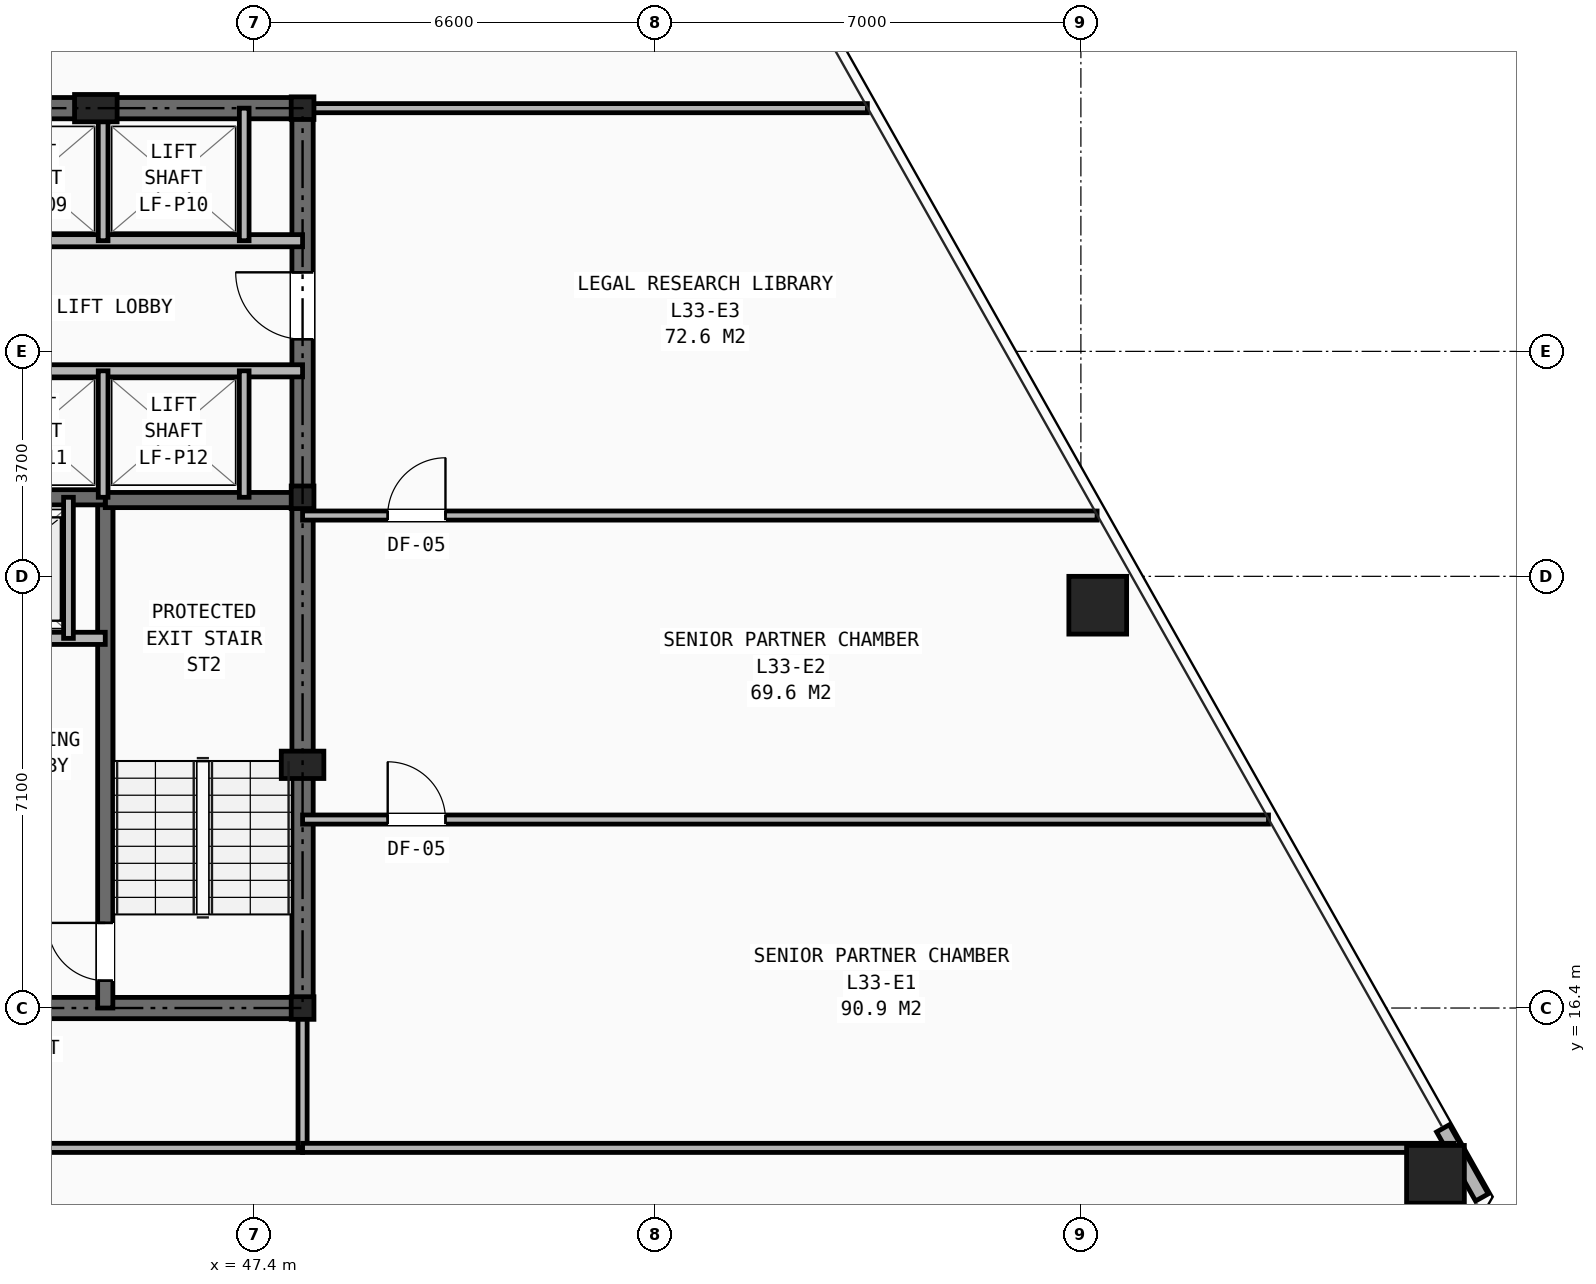
"""IFC4 building model, lengths in metres.
Left out: names, types, materials, properties, quantities, classifications, styles, units other than length and angle.
Written with IfcOpenShell. Run it as: python <this file> out.ifc"""

import sys

from ifc_helpers import new_model, si_unit, direction, frame, frame_2d, origin, origin_2d, place, context, subcontext, project, spatial, rectangle, hollow_rectangle, i_section, extrude, element, fill, save


model = new_model("IFC4")
c1 = context("Model", 3, precision=1e-05, world=origin(), true_north=direction((0.0, 1.0)))
c2 = subcontext(c1, "Body", "Model", "MODEL_VIEW")
j1 = project(units=[si_unit("LENGTHUNIT", "METRE"), si_unit("PLANEANGLEUNIT", "RADIAN")], contexts=[c1])
p1 = place(None, origin())
s1 = spatial("IfcSite", under=j1, at=p1, CompositionType="ELEMENT")
p2 = place(p1, origin())
s2 = spatial("IfcBuilding", under=s1, at=p2, CompositionType="ELEMENT")
p3 = place(p2, frame((0.0, 0.0, 116.0)))
s3 = spatial("IfcBuildingStorey", under=s2, at=p3, CompositionType="ELEMENT", Elevation=116.0)
for number, where, z_axis, x_axis in (
    (1, (48.2, 16.4, 0.0), (0.0, 0.0, 1.0), (1.0, 0.0, 0.0)),
    (2, (48.2, 24.8, 0.0), (0.0, 0.0, 1.0), (1.0, 0.0, 0.0)),
    (3, (48.2, 31.2, 0.0), (0.0, 0.0, 1.0), (1.0, 0.0, 0.0)),
):
    element("IfcColumn", number, at=place(p3, frame(where, z_axis=z_axis, x_axis=x_axis)), inside=s3, PredefinedType="COLUMN", context=c2, shape_type="SweptSolid", body=[
        extrude(i_section(OverallWidth=0.374, OverallDepth=0.372, WebThickness=0.016, FlangeThickness=0.026, at=origin_2d()), origin(), (0.0, 0.0, 1.0), 3.45),
    ])
for number, where, z_axis, x_axis in (
    (4, (48.2, 20.4, 0.0), (0.0, 0.0, 1.0), (1.0, 0.0, 0.0)),
    (5, (44.8, 31.2, 0.0), (0.0, 0.0, 1.0), (1.0, 0.0, 0.0)),
):
    element("IfcColumn", number, at=place(p3, frame(where, z_axis=z_axis, x_axis=x_axis)), inside=s3, PredefinedType="PILASTER", context=c2, shape_type="SweptSolid", body=[
        extrude(rectangle(XDim=0.7, YDim=0.45, at=origin_2d()), origin(), (0.0, 0.0, 1.0), 3.45),
    ])
for number, where, z_axis, x_axis in (
    (6, (66.831, 13.665, 0.0), (0.0, 0.0, 1.0), (1.0, 0.0, 0.0)),
    (7, (61.277, 23.025, 0.0), (0.0, 0.0, 1.0), (1.0, 0.0, 0.0)),
):
    element("IfcColumn", number, at=place(p3, frame(where, z_axis=z_axis, x_axis=x_axis)), inside=s3, PredefinedType="COLUMN", context=c2, shape_type="SweptSolid", body=[
        extrude(hollow_rectangle(XDim=0.95, YDim=0.95, WallThickness=0.065, at=origin_2d()), origin(), (0.0, 0.0, 1.0), 3.45),
    ])
p4 = place(p3, frame((67.596, 13.285, 0.0), z_axis=(0.0, 0.0, 1.0), x_axis=(-0.4912738615, 0.871005162446, 0.0)))
e8 = element("IfcWall", 8, at=p4, inside=s3, PredefinedType="SHEAR", context=c2, shape_type="SweptSolid", body=[
    extrude(rectangle(XDim=1.304, YDim=0.24, at=frame_2d((0.652, 0.0))), origin(), (0.0, 0.0, 1.0), 2.583),
])
p5 = place(p3, frame((31.8, 16.4, 0.0), z_axis=(0.0, 0.0, 1.0), x_axis=(1.0, 0.0, 0.0)))
e9 = element("IfcWall", 9, at=p5, inside=s3, PredefinedType="SHEAR", context=c2, shape_type="SweptSolid", body=[
    extrude(rectangle(XDim=16.4, YDim=0.35, at=frame_2d((8.2, 0.0))), origin(), (0.0, 0.0, 1.0), 3.21),
])
p6 = place(p5, frame((7.75, 0.0, 0.0)))
e10 = element("IfcOpeningElement", 10, at=p6, cuts=e9, PredefinedType="OPENING", context=c2, shape_type="SweptSolid", body=[
    extrude(rectangle(XDim=0.9, YDim=2.1, at=frame_2d((0.45, 1.05))), frame((0.0, 0.185, 0.0), z_axis=(0.0, -1.0, 0.0), x_axis=(1.0, 0.0, 0.0)), (0.0, 0.0, 1.0), 0.37),
])
p7 = place(p5, frame((4.2, 0.0, 0.0)))
e11 = element("IfcOpeningElement", 11, at=p7, cuts=e9, PredefinedType="OPENING", context=c2, shape_type="SweptSolid", body=[
    extrude(rectangle(XDim=0.95, YDim=2.1, at=frame_2d((0.475, 1.05))), frame((0.0, 0.185, 0.0), z_axis=(0.0, -1.0, 0.0), x_axis=(1.0, 0.0, 0.0)), (0.0, 0.0, 1.0), 0.37),
])
p8 = place(p5, frame((10.6, 0.0, 0.0)))
e12 = element("IfcOpeningElement", 12, at=p8, cuts=e9, PredefinedType="OPENING", context=c2, shape_type="SweptSolid", body=[
    extrude(rectangle(XDim=0.95, YDim=2.1, at=frame_2d((0.475, 1.05))), frame((0.0, 0.185, 0.0), z_axis=(0.0, -1.0, 0.0), x_axis=(1.0, 0.0, 0.0)), (0.0, 0.0, 1.0), 0.37),
])
p9 = place(p3, frame((31.8, 31.2, 0.0), z_axis=(0.0, 0.0, 1.0), x_axis=(1.0, 0.0, 0.0)))
e13 = element("IfcWall", 13, at=p9, inside=s3, PredefinedType="SHEAR", context=c2, shape_type="SweptSolid", body=[
    extrude(rectangle(XDim=16.4, YDim=0.35, at=frame_2d((8.2, 0.0))), origin(), (0.0, 0.0, 1.0), 3.21),
])
p10 = place(p3, frame((48.2, 16.4, 0.0), z_axis=(0.0, 0.0, 1.0), x_axis=(0.0, 1.0, 0.0)))
e14 = element("IfcWall", 14, at=p10, inside=s3, PredefinedType="SHEAR", context=c2, shape_type="SweptSolid", body=[
    extrude(rectangle(XDim=14.8, YDim=0.35, at=frame_2d((7.4, 0.0))), origin(), (0.0, 0.0, 1.0), 3.21),
])
p11 = place(p10, frame((11.0, 0.0, 0.0)))
e15 = element("IfcOpeningElement", 15, at=p11, cuts=e14, PredefinedType="OPENING", context=c2, shape_type="SweptSolid", body=[
    extrude(rectangle(XDim=1.1, YDim=2.15, at=frame_2d((0.55, 1.075))), frame((0.0, 0.185, 0.0), z_axis=(0.0, -1.0, 0.0), x_axis=(1.0, 0.0, 0.0)), (0.0, 0.0, 1.0), 0.37),
])
p12 = place(p3, frame((44.955, 16.4, 0.0), z_axis=(0.0, 0.0, 1.0), x_axis=(0.0, 1.0, 0.0)))
e16 = element("IfcWall", 16, at=p12, inside=s3, PredefinedType="SHEAR", context=c2, shape_type="SweptSolid", body=[
    extrude(rectangle(XDim=8.4, YDim=0.25, at=frame_2d((4.2, 0.0))), origin(), (0.0, 0.0, 1.0), 3.21),
])
p13 = place(p12, frame((0.45, 0.0, 0.0)))
e17 = element("IfcOpeningElement", 17, at=p13, cuts=e16, PredefinedType="OPENING", context=c2, shape_type="SweptSolid", body=[
    extrude(rectangle(XDim=0.95, YDim=2.1, at=frame_2d((0.475, 1.05))), frame((0.0, 0.135, 0.0), z_axis=(0.0, -1.0, 0.0), x_axis=(1.0, 0.0, 0.0)), (0.0, 0.0, 1.0), 0.27),
])
p14 = place(p3, frame((44.955, 24.755, 0.0), z_axis=(0.0, 0.0, 1.0), x_axis=(1.0, 0.0, 0.0)))
e18 = element("IfcWall", 18, at=p14, inside=s3, PredefinedType="SHEAR", context=c2, shape_type="SweptSolid", body=[
    extrude(rectangle(XDim=3.245, YDim=0.25, at=frame_2d((1.623, 0.0))), origin(), (0.0, 0.0, 1.0), 3.21),
])
p15 = place(p3, frame((35.045, 24.8, 0.0), z_axis=(0.0, 0.0, 1.0), x_axis=(1.0, 0.0, 0.0)))
e19 = element("IfcWall", 19, at=p15, inside=s3, PredefinedType="SHEAR", context=c2, shape_type="SweptSolid", body=[
    extrude(rectangle(XDim=9.91, YDim=0.25, at=frame_2d((4.955, 0.0))), origin(), (0.0, 0.0, 1.0), 3.21),
])
p16 = place(p3, frame((35.045, 22.48, 0.0), z_axis=(0.0, 0.0, 1.0), x_axis=(1.0, 0.0, 0.0)))
e20 = element("IfcWall", 20, at=p16, inside=s3, PredefinedType="SOLIDWALL", context=c2, shape_type="SweptSolid", body=[
    extrude(rectangle(XDim=9.91, YDim=0.2, at=frame_2d((4.955, 0.0))), origin(), (0.0, 0.0, 1.0), 3.21),
])
p17 = place(p16, frame((1.255, 0.0, 0.0)))
e21 = element("IfcOpeningElement", 21, at=p17, cuts=e20, PredefinedType="OPENING", context=c2, shape_type="SweptSolid", body=[
    extrude(rectangle(XDim=1.1, YDim=2.15, at=frame_2d((0.55, 1.075))), frame((0.0, 0.11, 0.0), z_axis=(0.0, -1.0, 0.0), x_axis=(1.0, 0.0, 0.0)), (0.0, 0.0, 1.0), 0.22),
])
p18 = place(p16, frame((7.555, 0.0, 0.0)))
e22 = element("IfcOpeningElement", 22, at=p18, cuts=e20, PredefinedType="OPENING", context=c2, shape_type="SweptSolid", body=[
    extrude(rectangle(XDim=1.1, YDim=2.15, at=frame_2d((0.55, 1.075))), frame((0.0, 0.11, 0.0), z_axis=(0.0, -1.0, 0.0), x_axis=(1.0, 0.0, 0.0)), (0.0, 0.0, 1.0), 0.22),
])
p19 = place(p16, frame((4.405, 0.0, 0.0)))
e23 = element("IfcOpeningElement", 23, at=p19, cuts=e20, PredefinedType="OPENING", context=c2, shape_type="SweptSolid", body=[
    extrude(rectangle(XDim=1.1, YDim=2.15, at=frame_2d((0.55, 1.075))), frame((0.0, 0.11, 0.0), z_axis=(0.0, -1.0, 0.0), x_axis=(1.0, 0.0, 0.0)), (0.0, 0.0, 1.0), 0.22),
])
p20 = place(p3, frame((44.35, 22.48, 0.0), z_axis=(0.0, 0.0, 1.0), x_axis=(0.0, 1.0, 0.0)))
e24 = element("IfcWall", 24, at=p20, inside=s3, PredefinedType="SOLIDWALL", context=c2, shape_type="SweptSolid", body=[
    extrude(rectangle(XDim=2.32, YDim=0.16, at=frame_2d((1.16, 0.0))), origin(), (0.0, 0.0, 1.0), 3.21),
])
p21 = place(p3, frame((31.8, 29.02, 0.0), z_axis=(0.0, 0.0, 1.0), x_axis=(1.0, 0.0, 0.0)))
e25 = element("IfcWall", 25, at=p21, inside=s3, PredefinedType="SOLIDWALL", context=c2, shape_type="SweptSolid", body=[
    extrude(rectangle(XDim=16.4, YDim=0.2, at=frame_2d((8.2, 0.0))), origin(), (0.0, 0.0, 1.0), 2.661),
])
p22 = place(p21, frame((0.55, 0.0, 0.0)))
e26 = element("IfcOpeningElement", 26, at=p22, cuts=e25, PredefinedType="OPENING", context=c2, shape_type="SweptSolid", body=[
    extrude(rectangle(XDim=0.85, YDim=2.05, at=frame_2d((0.425, 1.025))), frame((0.0, 0.11, 0.0), z_axis=(0.0, -1.0, 0.0), x_axis=(1.0, 0.0, 0.0)), (0.0, 0.0, 1.0), 0.22),
])
p23 = place(p3, frame((31.8, 26.88, 0.0), z_axis=(0.0, 0.0, 1.0), x_axis=(1.0, 0.0, 0.0)))
e27 = element("IfcWall", 27, at=p23, inside=s3, PredefinedType="SOLIDWALL", context=c2, shape_type="SweptSolid", body=[
    extrude(rectangle(XDim=16.4, YDim=0.2, at=frame_2d((8.2, 0.0))), origin(), (0.0, 0.0, 1.0), 2.661),
])
p24 = place(p23, frame((0.55, 0.0, 0.0)))
e28 = element("IfcOpeningElement", 28, at=p24, cuts=e27, PredefinedType="OPENING", context=c2, shape_type="SweptSolid", body=[
    extrude(rectangle(XDim=0.85, YDim=2.05, at=frame_2d((0.425, 1.025))), frame((0.0, 0.11, 0.0), z_axis=(0.0, -1.0, 0.0), x_axis=(1.0, 0.0, 0.0)), (0.0, 0.0, 1.0), 0.22),
])
p25 = place(p23, frame((2.55, 0.0, 0.0)))
e29 = element("IfcOpeningElement", 29, at=p25, cuts=e27, PredefinedType="OPENING", context=c2, shape_type="SweptSolid", body=[
    extrude(rectangle(XDim=1.1, YDim=2.15, at=frame_2d((0.55, 1.075))), frame((0.0, 0.11, 0.0), z_axis=(0.0, -1.0, 0.0), x_axis=(1.0, 0.0, 0.0)), (0.0, 0.0, 1.0), 0.22),
])
p26 = place(p23, frame((4.71, 0.0, 0.0)))
e30 = element("IfcOpeningElement", 30, at=p26, cuts=e27, PredefinedType="OPENING", context=c2, shape_type="SweptSolid", body=[
    extrude(rectangle(XDim=1.1, YDim=2.15, at=frame_2d((0.55, 1.075))), frame((0.0, 0.11, 0.0), z_axis=(0.0, -1.0, 0.0), x_axis=(1.0, 0.0, 0.0)), (0.0, 0.0, 1.0), 0.22),
])
p27 = place(p23, frame((6.87, 0.0, 0.0)))
e31 = element("IfcOpeningElement", 31, at=p27, cuts=e27, PredefinedType="OPENING", context=c2, shape_type="SweptSolid", body=[
    extrude(rectangle(XDim=1.1, YDim=2.15, at=frame_2d((0.55, 1.075))), frame((0.0, 0.11, 0.0), z_axis=(0.0, -1.0, 0.0), x_axis=(1.0, 0.0, 0.0)), (0.0, 0.0, 1.0), 0.22),
])
p28 = place(p23, frame((9.03, 0.0, 0.0)))
e32 = element("IfcOpeningElement", 32, at=p28, cuts=e27, PredefinedType="OPENING", context=c2, shape_type="SweptSolid", body=[
    extrude(rectangle(XDim=1.1, YDim=2.15, at=frame_2d((0.55, 1.075))), frame((0.0, 0.11, 0.0), z_axis=(0.0, -1.0, 0.0), x_axis=(1.0, 0.0, 0.0)), (0.0, 0.0, 1.0), 0.22),
])
for number, where, z_axis, x_axis in (
    (33, (44.92, 29.02, 0.0), (0.0, 0.0, 1.0), (0.0, 1.0, 0.0)),
    (34, (47.24, 29.02, 0.0), (0.0, 0.0, 1.0), (0.0, 1.0, 0.0)),
):
    element("IfcWall", number, at=place(p3, frame(where, z_axis=z_axis, x_axis=x_axis)), inside=s3, PredefinedType="SOLIDWALL", context=c2, shape_type="SweptSolid", body=[
        extrude(rectangle(XDim=2.18, YDim=0.16, at=frame_2d((1.09, 0.0))), origin(), (0.0, 0.0, 1.0), 2.661),
    ])
for number, where, z_axis, x_axis in (
    (35, (44.92, 24.8, 0.0), (0.0, 0.0, 1.0), (0.0, 1.0, 0.0)),
    (36, (47.24, 24.8, 0.0), (0.0, 0.0, 1.0), (0.0, 1.0, 0.0)),
):
    element("IfcWall", number, at=place(p3, frame(where, z_axis=z_axis, x_axis=x_axis)), inside=s3, PredefinedType="SOLIDWALL", context=c2, shape_type="SweptSolid", body=[
        extrude(rectangle(XDim=2.08, YDim=0.16, at=frame_2d((1.04, 0.0))), origin(), (0.0, 0.0, 1.0), 3.21),
    ])
p29 = place(p3, frame((29.6, 14.1, 0.0), z_axis=(0.0, 0.0, 1.0), x_axis=(1.0, 0.0, 0.0)))
e37 = element("IfcWall", 37, at=p29, inside=s3, PredefinedType="PARTITIONING", context=c2, shape_type="SweptSolid", body=[
    extrude(rectangle(XDim=18.6, YDim=0.15, at=frame_2d((9.3, 0.0))), origin(), (0.0, 0.0, 1.0), 2.225),
])
p30 = place(p29, frame((0.55, 0.0, 0.0)))
e38 = element("IfcOpeningElement", 38, at=p30, cuts=e37, PredefinedType="OPENING", context=c2, shape_type="SweptSolid", body=[
    extrude(rectangle(XDim=0.95, YDim=2.1, at=frame_2d((0.475, 1.05))), frame((0.0, 0.085, 0.0), z_axis=(0.0, -1.0, 0.0), x_axis=(1.0, 0.0, 0.0)), (0.0, 0.0, 1.0), 0.17),
])
p31 = place(p29, frame((3.95, 0.0, 0.0)))
e39 = element("IfcOpeningElement", 39, at=p31, cuts=e37, PredefinedType="OPENING", context=c2, shape_type="SweptSolid", body=[
    extrude(rectangle(XDim=0.95, YDim=2.1, at=frame_2d((0.475, 1.05))), frame((0.0, 0.085, 0.0), z_axis=(0.0, -1.0, 0.0), x_axis=(1.0, 0.0, 0.0)), (0.0, 0.0, 1.0), 0.17),
])
p32 = place(p29, frame((8.55, 0.0, 0.0)))
e40 = element("IfcOpeningElement", 40, at=p32, cuts=e37, PredefinedType="OPENING", context=c2, shape_type="SweptSolid", body=[
    extrude(rectangle(XDim=0.95, YDim=2.1, at=frame_2d((0.475, 1.05))), frame((0.0, 0.085, 0.0), z_axis=(0.0, -1.0, 0.0), x_axis=(1.0, 0.0, 0.0)), (0.0, 0.0, 1.0), 0.17),
])
p33 = place(p29, frame((13.35, 0.0, 0.0)))
e41 = element("IfcOpeningElement", 41, at=p33, cuts=e37, PredefinedType="OPENING", context=c2, shape_type="SweptSolid", body=[
    extrude(rectangle(XDim=0.95, YDim=2.1, at=frame_2d((0.475, 1.05))), frame((0.0, 0.085, 0.0), z_axis=(0.0, -1.0, 0.0), x_axis=(1.0, 0.0, 0.0)), (0.0, 0.0, 1.0), 0.17),
])
p34 = place(p3, frame((48.2, 14.1, 0.0), z_axis=(0.0, 0.0, 1.0), x_axis=(0.0, 1.0, 0.0)))
e42 = element("IfcWall", 42, at=p34, inside=s3, PredefinedType="PARTITIONING", context=c2, shape_type="SweptSolid", body=[
    extrude(rectangle(XDim=2.3, YDim=0.15, at=frame_2d((1.15, 0.0))), origin(), (0.0, 0.0, 1.0), 2.661),
])
p35 = place(p3, frame((48.2, 31.2, 0.0), z_axis=(0.0, 0.0, 1.0), x_axis=(1.0, 0.0, 0.0)))
e43 = element("IfcWall", 43, at=p35, inside=s3, PredefinedType="PARTITIONING", context=c2, shape_type="SweptSolid", body=[
    extrude(rectangle(XDim=9.289, YDim=0.15, at=frame_2d((4.645, 0.0))), origin(), (0.0, 0.0, 1.0), 2.225),
])
p36 = place(p3, frame((48.2, 14.1, 0.0), z_axis=(0.0, 0.0, 1.0), x_axis=(1.0, 0.0, 0.0)))
e44 = element("IfcWall", 44, at=p36, inside=s3, PredefinedType="PARTITIONING", context=c2, shape_type="SweptSolid", body=[
    extrude(rectangle(XDim=18.93, YDim=0.15, at=frame_2d((9.465, 0.0))), origin(), (0.0, 0.0, 1.0), 2.225),
])
p37 = place(p3, frame((48.2, 19.5, 0.0), z_axis=(0.0, 0.0, 1.0), x_axis=(1.0, 0.0, 0.0)))
e45 = element("IfcWall", 45, at=p37, inside=s3, PredefinedType="PARTITIONING", context=c2, shape_type="SweptSolid", body=[
    extrude(rectangle(XDim=15.885, YDim=0.15, at=frame_2d((7.943, 0.0))), origin(), (0.0, 0.0, 1.0), 2.589),
])
p38 = place(p37, frame((1.4, 0.0, 0.0)))
e46 = element("IfcOpeningElement", 46, at=p38, cuts=e45, PredefinedType="OPENING", context=c2, shape_type="SweptSolid", body=[
    extrude(rectangle(XDim=0.95, YDim=2.1, at=frame_2d((0.475, 1.05))), frame((0.0, 0.085, 0.0), z_axis=(0.0, -1.0, 0.0), x_axis=(1.0, 0.0, 0.0)), (0.0, 0.0, 1.0), 0.17),
])
p39 = place(p3, frame((48.2, 24.5, 0.0), z_axis=(0.0, 0.0, 1.0), x_axis=(1.0, 0.0, 0.0)))
e47 = element("IfcWall", 47, at=p39, inside=s3, PredefinedType="PARTITIONING", context=c2, shape_type="SweptSolid", body=[
    extrude(rectangle(XDim=13.066, YDim=0.15, at=frame_2d((6.533, 0.0))), origin(), (0.0, 0.0, 1.0), 2.589),
])
p40 = place(p39, frame((1.4, 0.0, 0.0)))
e48 = element("IfcOpeningElement", 48, at=p40, cuts=e47, PredefinedType="OPENING", context=c2, shape_type="SweptSolid", body=[
    extrude(rectangle(XDim=0.95, YDim=2.1, at=frame_2d((0.475, 1.05))), frame((0.0, 0.085, 0.0), z_axis=(0.0, -1.0, 0.0), x_axis=(1.0, 0.0, 0.0)), (0.0, 0.0, 1.0), 0.17),
])
p41 = place(p13, origin())
e49 = element("IfcDoor", 49, at=p41, inside=s3, OperationType="SINGLE_SWING_RIGHT", PredefinedType="DOOR", context=c2, shape_type="SweptSolid", body=[
    extrude(rectangle(XDim=0.95, YDim=2.1, at=frame_2d((0.475, 1.05))), frame((0.0, 0.025, 0.0), z_axis=(0.0, -1.0, 0.0), x_axis=(1.0, 0.0, 0.0)), (0.0, 0.0, 1.0), 0.05),
])
fill(e17, e49)
p42 = place(p11, origin())
e50 = element("IfcDoor", 50, at=p42, inside=s3, OperationType="SINGLE_SWING_RIGHT", PredefinedType="DOOR", context=c2, shape_type="SweptSolid", body=[
    extrude(rectangle(XDim=1.1, YDim=2.15, at=frame_2d((0.55, 1.075))), frame((0.0, 0.025, 0.0), z_axis=(0.0, -1.0, 0.0), x_axis=(1.0, 0.0, 0.0)), (0.0, 0.0, 1.0), 0.05),
])
fill(e15, e50)
p43 = place(p38, origin())
e51 = element("IfcDoor", 51, at=p43, inside=s3, OperationType="SINGLE_SWING_LEFT", PredefinedType="DOOR", context=c2, shape_type="SweptSolid", body=[
    extrude(rectangle(XDim=0.95, YDim=2.1, at=frame_2d((0.475, 1.05))), frame((0.0, 0.025, 0.0), z_axis=(0.0, -1.0, 0.0), x_axis=(1.0, 0.0, 0.0)), (0.0, 0.0, 1.0), 0.05),
])
fill(e46, e51)
p44 = place(p40, origin())
e52 = element("IfcDoor", 52, at=p44, inside=s3, OperationType="SINGLE_SWING_RIGHT", PredefinedType="DOOR", context=c2, shape_type="SweptSolid", body=[
    extrude(rectangle(XDim=0.95, YDim=2.1, at=frame_2d((0.475, 1.05))), frame((0.0, 0.025, 0.0), z_axis=(0.0, -1.0, 0.0), x_axis=(1.0, 0.0, 0.0)), (0.0, 0.0, 1.0), 0.05),
])
fill(e48, e52)
save(model, sys.argv[1])
